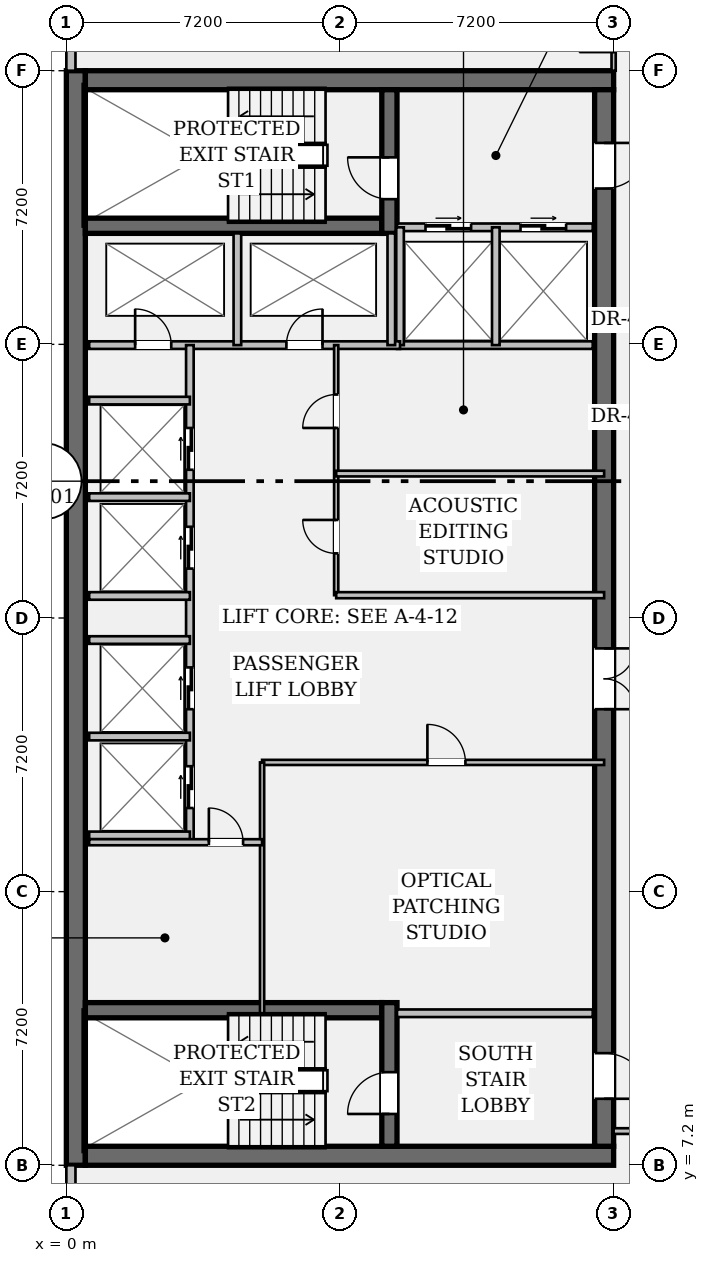
"""IFC4 building model, lengths in metres.
Left out: names, types, materials, properties, quantities, classifications, styles, units other than length and angle.
Written with IfcOpenShell. Run it as: python <this file> out.ifc"""

import sys

from ifc_helpers import new_model, si_unit, direction, frame, frame_2d, origin, place, context, subcontext, project, spatial, rectangle, extrude, element, fill, save


model = new_model("IFC4")
c1 = context("Model", 3, precision=1e-05, world=origin(), true_north=direction((0.0, 1.0)))
c2 = subcontext(c1, "Body", "Model", "MODEL_VIEW")
j1 = project(units=[si_unit("LENGTHUNIT", "METRE"), si_unit("PLANEANGLEUNIT", "RADIAN")], contexts=[c1])
p1 = place(None, origin())
s1 = spatial("IfcSite", under=j1, at=p1, CompositionType="ELEMENT")
p2 = place(p1, origin())
s2 = spatial("IfcBuilding", under=s1, at=p2, CompositionType="ELEMENT")
p3 = place(p2, frame((0.0, 0.0, 197.75)))
s3 = spatial("IfcBuildingStorey", under=s2, at=p3, CompositionType="ELEMENT", Elevation=197.75)
p4 = place(p3, frame((0.25, 7.2, 0.0), z_axis=(0.0, 0.0, 1.0), x_axis=(0.0, 1.0, 0.0)))
e1 = element("IfcWall", 1, at=p4, inside=s3, PredefinedType="SHEAR", context=c2, shape_type="SweptSolid", body=[
    extrude(rectangle(XDim=28.8, YDim=0.5, at=frame_2d((14.4, 0.0))), origin(), (0.0, 0.0, 1.0), 3.24),
])
for number, where, z_axis, x_axis in (
    (2, (0.5, 7.45, 0.0), (0.0, 0.0, 1.0), (1.0, 0.0, 0.0)),
    (3, (0.5, 35.75, 0.0), (0.0, 0.0, 1.0), (1.0, 0.0, 0.0)),
):
    element("IfcWall", number, at=place(p3, frame(where, z_axis=z_axis, x_axis=x_axis)), inside=s3, PredefinedType="SHEAR", context=c2, shape_type="SweptSolid", body=[
        extrude(rectangle(XDim=13.9, YDim=0.5, at=frame_2d((6.95, 0.0))), origin(), (0.0, 0.0, 1.0), 3.24),
    ])
p5 = place(p3, frame((14.15, 35.5, 0.0), z_axis=(0.0, 0.0, 1.0), x_axis=(0.0, -1.0, 0.0)))
e4 = element("IfcWall", 4, at=p5, inside=s3, PredefinedType="SHEAR", context=c2, shape_type="SweptSolid", body=[
    extrude(rectangle(XDim=27.8, YDim=0.5, at=frame_2d((13.9, 0.0))), origin(), (0.0, 0.0, 1.0), 3.24),
])
p6 = place(p5, frame((1.4, 0.0, 0.0)))
e5 = element("IfcOpeningElement", 5, at=p6, cuts=e4, PredefinedType="OPENING", context=c2, shape_type="SweptSolid", body=[
    extrude(rectangle(XDim=1.2, YDim=2.15, at=frame_2d((0.6, 1.075))), frame((0.0, 0.262, 0.0), z_axis=(0.0, -1.0, 0.0), x_axis=(1.0, 0.0, 0.0)), (0.0, 0.0, 1.0), 0.524),
])
p7 = place(p5, frame((25.35, 0.0, 0.0)))
e6 = element("IfcOpeningElement", 6, at=p7, cuts=e4, PredefinedType="OPENING", context=c2, shape_type="SweptSolid", body=[
    extrude(rectangle(XDim=1.2, YDim=2.15, at=frame_2d((0.6, 1.075))), frame((0.0, 0.262, 0.0), z_axis=(0.0, -1.0, 0.0), x_axis=(1.0, 0.0, 0.0)), (0.0, 0.0, 1.0), 0.524),
])
p8 = place(p5, frame((14.7, 0.0, 0.0)))
e7 = element("IfcOpeningElement", 7, at=p8, cuts=e4, PredefinedType="OPENING", context=c2, shape_type="SweptSolid", body=[
    extrude(rectangle(XDim=1.6, YDim=2.2, at=frame_2d((0.8, 1.1))), frame((0.0, 0.262, 0.0), z_axis=(0.0, -1.0, 0.0), x_axis=(1.0, 0.0, 0.0)), (0.0, 0.0, 1.0), 0.524),
])
for number, where, z_axis, x_axis in (
    (8, (0.5, 31.92, 0.0), (0.0, 0.0, 1.0), (1.0, 0.0, 0.0)),
    (9, (0.5, 11.28, 0.0), (0.0, 0.0, 1.0), (1.0, 0.0, 0.0)),
):
    element("IfcWall", number, at=place(p3, frame(where, z_axis=z_axis, x_axis=x_axis)), inside=s3, PredefinedType="SHEAR", context=c2, shape_type="SweptSolid", body=[
        extrude(rectangle(XDim=7.8, YDim=0.4, at=frame_2d((3.9, 0.0))), origin(), (0.0, 0.0, 1.0), 3.24),
    ])
p9 = place(p3, frame((8.5, 31.72, 0.0), z_axis=(0.0, 0.0, 1.0), x_axis=(0.0, 1.0, 0.0)))
e10 = element("IfcWall", 10, at=p9, inside=s3, PredefinedType="SHEAR", context=c2, shape_type="SweptSolid", body=[
    extrude(rectangle(XDim=3.78, YDim=0.4, at=frame_2d((1.89, 0.0))), origin(), (0.0, 0.0, 1.0), 3.24),
])
p10 = place(p9, frame((0.9, 0.0, 0.0)))
e11 = element("IfcOpeningElement", 11, at=p10, cuts=e10, PredefinedType="OPENING", context=c2, shape_type="SweptSolid", body=[
    extrude(rectangle(XDim=1.1, YDim=2.15, at=frame_2d((0.55, 1.075))), frame((0.0, 0.212, 0.0), z_axis=(0.0, -1.0, 0.0), x_axis=(1.0, 0.0, 0.0)), (0.0, 0.0, 1.0), 0.424),
])
p11 = place(p3, frame((8.5, 7.7, 0.0), z_axis=(0.0, 0.0, 1.0), x_axis=(0.0, 1.0, 0.0)))
e12 = element("IfcWall", 12, at=p11, inside=s3, PredefinedType="SHEAR", context=c2, shape_type="SweptSolid", body=[
    extrude(rectangle(XDim=3.78, YDim=0.4, at=frame_2d((1.89, 0.0))), origin(), (0.0, 0.0, 1.0), 3.24),
])
p12 = place(p11, frame((0.85, 0.0, 0.0)))
e13 = element("IfcOpeningElement", 13, at=p12, cuts=e12, PredefinedType="OPENING", context=c2, shape_type="SweptSolid", body=[
    extrude(rectangle(XDim=1.1, YDim=2.15, at=frame_2d((0.55, 1.075))), frame((0.0, 0.212, 0.0), z_axis=(0.0, -1.0, 0.0), x_axis=(1.0, 0.0, 0.0)), (0.0, 0.0, 1.0), 0.424),
])
for number, where, z_axis, x_axis in (
    (14, (0.12, 5.91, 0.0), (0.0, 0.0, 1.0), (0.0, 1.0, 0.0)),
    (15, (0.12, 36.0, 0.0), (0.0, 0.0, 1.0), (0.0, 1.0, 0.0)),
):
    element("IfcWall", number, at=place(p3, frame(where, z_axis=z_axis, x_axis=x_axis)), inside=s3, PredefinedType="STANDARD", context=c2, shape_type="SweptSolid", body=[
        extrude(rectangle(XDim=1.29, YDim=0.24, at=frame_2d((0.645, 0.0))), origin(), (0.0, 0.0, 1.0), 3.24),
    ])
p13 = place(p3, frame((8.7, 31.88, 0.0), z_axis=(0.0, 0.0, 1.0), x_axis=(1.0, 0.0, 0.0)))
e16 = element("IfcWall", 16, at=p13, inside=s3, PredefinedType="PARTITIONING", context=c2, shape_type="SweptSolid", body=[
    extrude(rectangle(XDim=5.15, YDim=0.2, at=frame_2d((2.575, 0.0))), origin(), (0.0, 0.0, 1.0), 3.24),
])
p14 = place(p13, frame((0.75, 0.0, 0.0)))
e17 = element("IfcOpeningElement", 17, at=p14, cuts=e16, PredefinedType="OPENING", context=c2, shape_type="SweptSolid", body=[
    extrude(rectangle(XDim=1.2, YDim=2.2, at=frame_2d((0.6, 1.1))), frame((0.0, 0.112, 0.0), z_axis=(0.0, -1.0, 0.0), x_axis=(1.0, 0.0, 0.0)), (0.0, 0.0, 1.0), 0.224),
])
p15 = place(p13, frame((3.25, 0.0, 0.0)))
e18 = element("IfcOpeningElement", 18, at=p15, cuts=e16, PredefinedType="OPENING", context=c2, shape_type="SweptSolid", body=[
    extrude(rectangle(XDim=1.2, YDim=2.2, at=frame_2d((0.6, 1.1))), frame((0.0, 0.112, 0.0), z_axis=(0.0, -1.0, 0.0), x_axis=(1.0, 0.0, 0.0)), (0.0, 0.0, 1.0), 0.224),
])
for number, where, z_axis, x_axis in (
    (19, (8.7, 11.2, 0.0), (0.0, 0.0, 1.0), (1.0, 0.0, 0.0)),
    (20, (8.7, 28.78, 0.0), (0.0, 0.0, 1.0), (1.0, 0.0, 0.0)),
):
    element("IfcWall", number, at=place(p3, frame(where, z_axis=z_axis, x_axis=x_axis)), inside=s3, PredefinedType="PARTITIONING", context=c2, shape_type="SweptSolid", body=[
        extrude(rectangle(XDim=5.15, YDim=0.2, at=frame_2d((2.575, 0.0))), origin(), (0.0, 0.0, 1.0), 3.24),
    ])
for number, where, z_axis, x_axis in (
    (21, (8.78, 28.78, 0.0), (0.0, 0.0, 1.0), (0.0, 1.0, 0.0)),
    (22, (11.3, 28.78, 0.0), (0.0, 0.0, 1.0), (0.0, 1.0, 0.0)),
):
    element("IfcWall", number, at=place(p3, frame(where, z_axis=z_axis, x_axis=x_axis)), inside=s3, PredefinedType="PARTITIONING", context=c2, shape_type="SweptSolid", body=[
        extrude(rectangle(XDim=3.1, YDim=0.2, at=frame_2d((1.55, 0.0))), origin(), (0.0, 0.0, 1.0), 3.24),
    ])
p16 = place(p3, frame((0.6, 28.78, 0.0), z_axis=(0.0, 0.0, 1.0), x_axis=(1.0, 0.0, 0.0)))
e23 = element("IfcWall", 23, at=p16, inside=s3, PredefinedType="PARTITIONING", context=c2, shape_type="SweptSolid", body=[
    extrude(rectangle(XDim=8.18, YDim=0.2, at=frame_2d((4.09, 0.0))), origin(), (0.0, 0.0, 1.0), 3.24),
])
p17 = place(p16, frame((1.21, 0.0, 0.0)))
e24 = element("IfcOpeningElement", 24, at=p17, cuts=e23, PredefinedType="OPENING", context=c2, shape_type="SweptSolid", body=[
    extrude(rectangle(XDim=0.95, YDim=2.15, at=frame_2d((0.475, 1.075))), frame((0.0, 0.112, 0.0), z_axis=(0.0, -1.0, 0.0), x_axis=(1.0, 0.0, 0.0)), (0.0, 0.0, 1.0), 0.224),
])
p18 = place(p16, frame((5.19, 0.0, 0.0)))
e25 = element("IfcOpeningElement", 25, at=p18, cuts=e23, PredefinedType="OPENING", context=c2, shape_type="SweptSolid", body=[
    extrude(rectangle(XDim=0.95, YDim=2.15, at=frame_2d((0.475, 1.075))), frame((0.0, 0.112, 0.0), z_axis=(0.0, -1.0, 0.0), x_axis=(1.0, 0.0, 0.0)), (0.0, 0.0, 1.0), 0.224),
])
for number, where, z_axis, x_axis in (
    (26, (4.5, 28.78, 0.0), (0.0, 0.0, 1.0), (0.0, 1.0, 0.0)),
    (27, (8.55, 28.78, 0.0), (0.0, 0.0, 1.0), (0.0, 1.0, 0.0)),
):
    element("IfcWall", number, at=place(p3, frame(where, z_axis=z_axis, x_axis=x_axis)), inside=s3, PredefinedType="PARTITIONING", context=c2, shape_type="SweptSolid", body=[
        extrude(rectangle(XDim=2.94, YDim=0.2, at=frame_2d((1.47, 0.0))), origin(), (0.0, 0.0, 1.0), 3.24),
    ])
p19 = place(p3, frame((3.25, 15.7, 0.0), z_axis=(0.0, 0.0, 1.0), x_axis=(0.0, 1.0, 0.0)))
e28 = element("IfcWall", 28, at=p19, inside=s3, PredefinedType="PARTITIONING", context=c2, shape_type="SweptSolid", body=[
    extrude(rectangle(XDim=13.08, YDim=0.2, at=frame_2d((6.54, 0.0))), origin(), (0.0, 0.0, 1.0), 3.24),
])
p20 = place(p19, frame((0.9, 0.0, 0.0)))
e29 = element("IfcOpeningElement", 29, at=p20, cuts=e28, PredefinedType="OPENING", context=c2, shape_type="SweptSolid", body=[
    extrude(rectangle(XDim=1.1, YDim=2.2, at=frame_2d((0.55, 1.1))), frame((0.0, 0.112, 0.0), z_axis=(0.0, -1.0, 0.0), x_axis=(1.0, 0.0, 0.0)), (0.0, 0.0, 1.0), 0.224),
])
p21 = place(p19, frame((3.5, 0.0, 0.0)))
e30 = element("IfcOpeningElement", 30, at=p21, cuts=e28, PredefinedType="OPENING", context=c2, shape_type="SweptSolid", body=[
    extrude(rectangle(XDim=1.1, YDim=2.2, at=frame_2d((0.55, 1.1))), frame((0.0, 0.112, 0.0), z_axis=(0.0, -1.0, 0.0), x_axis=(1.0, 0.0, 0.0)), (0.0, 0.0, 1.0), 0.224),
])
p22 = place(p19, frame((7.2, 0.0, 0.0)))
e31 = element("IfcOpeningElement", 31, at=p22, cuts=e28, PredefinedType="OPENING", context=c2, shape_type="SweptSolid", body=[
    extrude(rectangle(XDim=1.1, YDim=2.2, at=frame_2d((0.55, 1.1))), frame((0.0, 0.112, 0.0), z_axis=(0.0, -1.0, 0.0), x_axis=(1.0, 0.0, 0.0)), (0.0, 0.0, 1.0), 0.224),
])
p23 = place(p19, frame((9.8, 0.0, 0.0)))
e32 = element("IfcOpeningElement", 32, at=p23, cuts=e28, PredefinedType="OPENING", context=c2, shape_type="SweptSolid", body=[
    extrude(rectangle(XDim=1.1, YDim=2.2, at=frame_2d((0.55, 1.1))), frame((0.0, 0.112, 0.0), z_axis=(0.0, -1.0, 0.0), x_axis=(1.0, 0.0, 0.0)), (0.0, 0.0, 1.0), 0.224),
])
for number, where, z_axis, x_axis in (
    (33, (0.6, 15.88, 0.0), (0.0, 0.0, 1.0), (1.0, 0.0, 0.0)),
    (34, (0.6, 18.48, 0.0), (0.0, 0.0, 1.0), (1.0, 0.0, 0.0)),
    (35, (0.6, 22.18, 0.0), (0.0, 0.0, 1.0), (1.0, 0.0, 0.0)),
    (36, (0.6, 24.78, 0.0), (0.0, 0.0, 1.0), (1.0, 0.0, 0.0)),
    (37, (0.6, 21.02, 0.0), (0.0, 0.0, 1.0), (1.0, 0.0, 0.0)),
    (38, (0.6, 27.32, 0.0), (0.0, 0.0, 1.0), (1.0, 0.0, 0.0)),
):
    element("IfcWall", number, at=place(p3, frame(where, z_axis=z_axis, x_axis=x_axis)), inside=s3, PredefinedType="PARTITIONING", context=c2, shape_type="SweptSolid", body=[
        extrude(rectangle(XDim=2.65, YDim=0.2, at=frame_2d((1.325, 0.0))), origin(), (0.0, 0.0, 1.0), 3.24),
    ])
p24 = place(p3, frame((7.1, 22.2, 0.0), z_axis=(0.0, 0.0, 1.0), x_axis=(0.0, 1.0, 0.0)))
e39 = element("IfcWall", 39, at=p24, inside=s3, PredefinedType="PARTITIONING", context=c2, shape_type="SweptSolid", body=[
    extrude(rectangle(XDim=6.58, YDim=0.11, at=frame_2d((3.29, 0.0))), origin(), (0.0, 0.0, 1.0), 3.24),
])
p25 = place(p24, frame((1.1, 0.0, 0.0)))
e40 = element("IfcOpeningElement", 40, at=p25, cuts=e39, PredefinedType="OPENING", context=c2, shape_type="SweptSolid", body=[
    extrude(rectangle(XDim=0.88, YDim=2.15, at=frame_2d((0.44, 1.075))), frame((0.0, 0.067, 0.0), z_axis=(0.0, -1.0, 0.0), x_axis=(1.0, 0.0, 0.0)), (0.0, 0.0, 1.0), 0.134),
])
p26 = place(p24, frame((4.4, 0.0, 0.0)))
e41 = element("IfcOpeningElement", 41, at=p26, cuts=e39, PredefinedType="OPENING", context=c2, shape_type="SweptSolid", body=[
    extrude(rectangle(XDim=0.88, YDim=2.15, at=frame_2d((0.44, 1.075))), frame((0.0, 0.067, 0.0), z_axis=(0.0, -1.0, 0.0), x_axis=(1.0, 0.0, 0.0)), (0.0, 0.0, 1.0), 0.134),
])
p27 = place(p3, frame((7.1, 22.2, 0.0), z_axis=(0.0, 0.0, 1.0), x_axis=(1.0, 0.0, 0.0)))
e42 = element("IfcWall", 42, at=p27, inside=s3, PredefinedType="PARTITIONING", context=c2, shape_type="SweptSolid", body=[
    extrude(rectangle(XDim=7.05, YDim=0.16, at=frame_2d((3.525, 0.0))), origin(), (0.0, 0.0, 1.0), 3.24),
])
p28 = place(p3, frame((7.1, 25.4, 0.0), z_axis=(0.0, 0.0, 1.0), x_axis=(1.0, 0.0, 0.0)))
e43 = element("IfcWall", 43, at=p28, inside=s3, PredefinedType="PARTITIONING", context=c2, shape_type="SweptSolid", body=[
    extrude(rectangle(XDim=7.05, YDim=0.15, at=frame_2d((3.525, 0.0))), origin(), (0.0, 0.0, 1.0), 3.24),
])
p29 = place(p3, frame((5.15, 17.8, 0.0), z_axis=(0.0, 0.0, 1.0), x_axis=(1.0, 0.0, 0.0)))
e44 = element("IfcWall", 44, at=p29, inside=s3, PredefinedType="PARTITIONING", context=c2, shape_type="SweptSolid", body=[
    extrude(rectangle(XDim=9.0, YDim=0.135, at=frame_2d((4.5, 0.0))), origin(), (0.0, 0.0, 1.0), 3.24),
])
p30 = place(p29, frame((4.35, 0.0, 0.0)))
e45 = element("IfcOpeningElement", 45, at=p30, cuts=e44, PredefinedType="OPENING", context=c2, shape_type="SweptSolid", body=[
    extrude(rectangle(XDim=1.0, YDim=2.15, at=frame_2d((0.5, 1.075))), frame((0.0, 0.08, 0.0), z_axis=(0.0, -1.0, 0.0), x_axis=(1.0, 0.0, 0.0)), (0.0, 0.0, 1.0), 0.159),
])
p31 = place(p3, frame((5.15, 11.2, 0.0), z_axis=(0.0, 0.0, 1.0), x_axis=(0.0, 1.0, 0.0)))
e46 = element("IfcWall", 46, at=p31, inside=s3, PredefinedType="PARTITIONING", context=c2, shape_type="SweptSolid", body=[
    extrude(rectangle(XDim=6.6, YDim=0.11, at=frame_2d((3.3, 0.0))), origin(), (0.0, 0.0, 1.0), 3.24),
])
p32 = place(p3, frame((0.6, 15.7, 0.0), z_axis=(0.0, 0.0, 1.0), x_axis=(1.0, 0.0, 0.0)))
e47 = element("IfcWall", 47, at=p32, inside=s3, PredefinedType="PARTITIONING", context=c2, shape_type="SweptSolid", body=[
    extrude(rectangle(XDim=4.55, YDim=0.16, at=frame_2d((2.275, 0.0))), origin(), (0.0, 0.0, 1.0), 3.24),
])
p33 = place(p32, frame((3.15, 0.0, 0.0)))
e48 = element("IfcOpeningElement", 48, at=p33, cuts=e47, PredefinedType="OPENING", context=c2, shape_type="SweptSolid", body=[
    extrude(rectangle(XDim=0.9, YDim=2.15, at=frame_2d((0.45, 1.075))), frame((0.0, 0.092, 0.0), z_axis=(0.0, -1.0, 0.0), x_axis=(1.0, 0.0, 0.0)), (0.0, 0.0, 1.0), 0.184),
])
p34 = place(p3, frame((14.4, 8.1, 0.0), z_axis=(0.0, 0.0, 1.0), x_axis=(1.0, 0.0, 0.0)))
e49 = element("IfcWall", 49, at=p34, inside=s3, PredefinedType="PARTITIONING", context=c2, shape_type="SweptSolid", body=[
    extrude(rectangle(XDim=2.95, YDim=0.15, at=frame_2d((1.475, 0.0))), origin(), (0.0, 0.0, 1.0), 2.808),
])
p35 = place(p34, frame((0.95, 0.0, 0.0)))
e50 = element("IfcOpeningElement", 50, at=p35, cuts=e49, PredefinedType="OPENING", context=c2, shape_type="SweptSolid", body=[
    extrude(rectangle(XDim=0.88, YDim=2.15, at=frame_2d((0.44, 1.075))), frame((0.0, 0.087, 0.0), z_axis=(0.0, -1.0, 0.0), x_axis=(1.0, 0.0, 0.0)), (0.0, 0.0, 1.0), 0.174),
])
p36 = place(p3, frame((14.4, 36.0, 0.0), z_axis=(0.0, 0.0, 1.0), x_axis=(0.0, 1.0, 0.0)))
e51 = element("IfcWall", 51, at=p36, inside=s3, PredefinedType="PARTITIONING", context=c2, shape_type="SweptSolid", body=[
    extrude(rectangle(XDim=3.88, YDim=0.11, at=frame_2d((1.94, 0.0))), origin(), (0.0, 0.0, 1.0), 2.613),
])
p37 = place(p36, frame((0.49, 0.0, 0.0)))
e52 = element("IfcOpeningElement", 52, at=p37, cuts=e51, PredefinedType="OPENING", context=c2, shape_type="SweptSolid", body=[
    extrude(rectangle(XDim=0.9, YDim=2.15, at=frame_2d((0.45, 1.075))), frame((0.0, 0.067, 0.0), z_axis=(0.0, -1.0, 0.0), x_axis=(1.0, 0.0, 0.0)), (0.0, 0.0, 1.0), 0.134),
])
p38 = place(p10, origin())
e53 = element("IfcDoor", 53, at=p38, inside=s3, OperationType="SINGLE_SWING_RIGHT", PredefinedType="DOOR", context=c2, shape_type="SweptSolid", body=[
    extrude(rectangle(XDim=1.1, YDim=2.15, at=frame_2d((0.55, 1.075))), frame((0.0, 0.025, 0.0), z_axis=(0.0, -1.0, 0.0), x_axis=(1.0, 0.0, 0.0)), (0.0, 0.0, 1.0), 0.05),
])
fill(e11, e53)
p39 = place(p6, origin())
e54 = element("IfcDoor", 54, at=p39, inside=s3, OperationType="SINGLE_SWING_LEFT", PredefinedType="DOOR", context=c2, shape_type="SweptSolid", body=[
    extrude(rectangle(XDim=1.2, YDim=2.15, at=frame_2d((0.6, 1.075))), frame((0.0, 0.025, 0.0), z_axis=(0.0, -1.0, 0.0), x_axis=(1.0, 0.0, 0.0)), (0.0, 0.0, 1.0), 0.05),
])
fill(e5, e54)
p40 = place(p12, origin())
e55 = element("IfcDoor", 55, at=p40, inside=s3, OperationType="SINGLE_SWING_LEFT", PredefinedType="DOOR", context=c2, shape_type="SweptSolid", body=[
    extrude(rectangle(XDim=1.1, YDim=2.15, at=frame_2d((0.55, 1.075))), frame((0.0, 0.025, 0.0), z_axis=(0.0, -1.0, 0.0), x_axis=(1.0, 0.0, 0.0)), (0.0, 0.0, 1.0), 0.05),
])
fill(e13, e55)
p41 = place(p7, origin())
e56 = element("IfcDoor", 56, at=p41, inside=s3, OperationType="SINGLE_SWING_RIGHT", PredefinedType="DOOR", context=c2, shape_type="SweptSolid", body=[
    extrude(rectangle(XDim=1.2, YDim=2.15, at=frame_2d((0.6, 1.075))), frame((0.0, 0.025, 0.0), z_axis=(0.0, -1.0, 0.0), x_axis=(1.0, 0.0, 0.0)), (0.0, 0.0, 1.0), 0.05),
])
fill(e6, e56)
p42 = place(p14, origin())
e57 = element("IfcDoor", 57, at=p42, inside=s3, OperationType="DOUBLE_DOOR_SLIDING", PredefinedType="DOOR", context=c2, shape_type="SweptSolid", body=[
    extrude(rectangle(XDim=1.2, YDim=2.2, at=frame_2d((0.6, 1.1))), frame((0.0, 0.025, 0.0), z_axis=(0.0, -1.0, 0.0), x_axis=(1.0, 0.0, 0.0)), (0.0, 0.0, 1.0), 0.05),
])
fill(e17, e57)
p43 = place(p15, origin())
e58 = element("IfcDoor", 58, at=p43, inside=s3, OperationType="DOUBLE_DOOR_SLIDING", PredefinedType="DOOR", context=c2, shape_type="SweptSolid", body=[
    extrude(rectangle(XDim=1.2, YDim=2.2, at=frame_2d((0.6, 1.1))), frame((0.0, 0.025, 0.0), z_axis=(0.0, -1.0, 0.0), x_axis=(1.0, 0.0, 0.0)), (0.0, 0.0, 1.0), 0.05),
])
fill(e18, e58)
p44 = place(p17, origin())
e59 = element("IfcDoor", 59, at=p44, inside=s3, OperationType="SINGLE_SWING_LEFT", PredefinedType="DOOR", context=c2, shape_type="SweptSolid", body=[
    extrude(rectangle(XDim=0.95, YDim=2.15, at=frame_2d((0.475, 1.075))), frame((0.0, 0.025, 0.0), z_axis=(0.0, -1.0, 0.0), x_axis=(1.0, 0.0, 0.0)), (0.0, 0.0, 1.0), 0.05),
])
fill(e24, e59)
p45 = place(p18, origin())
e60 = element("IfcDoor", 60, at=p45, inside=s3, OperationType="SINGLE_SWING_RIGHT", PredefinedType="DOOR", context=c2, shape_type="SweptSolid", body=[
    extrude(rectangle(XDim=0.95, YDim=2.15, at=frame_2d((0.475, 1.075))), frame((0.0, 0.025, 0.0), z_axis=(0.0, -1.0, 0.0), x_axis=(1.0, 0.0, 0.0)), (0.0, 0.0, 1.0), 0.05),
])
fill(e25, e60)
p46 = place(p8, origin())
e61 = element("IfcDoor", 61, at=p46, inside=s3, OperationType="DOUBLE_DOOR_SINGLE_SWING", PredefinedType="DOOR", context=c2, shape_type="SweptSolid", body=[
    extrude(rectangle(XDim=1.6, YDim=2.2, at=frame_2d((0.8, 1.1))), frame((0.0, 0.025, 0.0), z_axis=(0.0, -1.0, 0.0), x_axis=(1.0, 0.0, 0.0)), (0.0, 0.0, 1.0), 0.05),
])
fill(e7, e61)
p47 = place(p20, origin())
e62 = element("IfcDoor", 62, at=p47, inside=s3, OperationType="DOUBLE_DOOR_SLIDING", PredefinedType="DOOR", context=c2, shape_type="SweptSolid", body=[
    extrude(rectangle(XDim=1.1, YDim=2.2, at=frame_2d((0.55, 1.1))), frame((0.0, 0.025, 0.0), z_axis=(0.0, -1.0, 0.0), x_axis=(1.0, 0.0, 0.0)), (0.0, 0.0, 1.0), 0.05),
])
fill(e29, e62)
p48 = place(p21, origin())
e63 = element("IfcDoor", 63, at=p48, inside=s3, OperationType="DOUBLE_DOOR_SLIDING", PredefinedType="DOOR", context=c2, shape_type="SweptSolid", body=[
    extrude(rectangle(XDim=1.1, YDim=2.2, at=frame_2d((0.55, 1.1))), frame((0.0, 0.025, 0.0), z_axis=(0.0, -1.0, 0.0), x_axis=(1.0, 0.0, 0.0)), (0.0, 0.0, 1.0), 0.05),
])
fill(e30, e63)
p49 = place(p22, origin())
e64 = element("IfcDoor", 64, at=p49, inside=s3, OperationType="DOUBLE_DOOR_SLIDING", PredefinedType="DOOR", context=c2, shape_type="SweptSolid", body=[
    extrude(rectangle(XDim=1.1, YDim=2.2, at=frame_2d((0.55, 1.1))), frame((0.0, 0.025, 0.0), z_axis=(0.0, -1.0, 0.0), x_axis=(1.0, 0.0, 0.0)), (0.0, 0.0, 1.0), 0.05),
])
fill(e31, e64)
p50 = place(p23, origin())
e65 = element("IfcDoor", 65, at=p50, inside=s3, OperationType="DOUBLE_DOOR_SLIDING", PredefinedType="DOOR", context=c2, shape_type="SweptSolid", body=[
    extrude(rectangle(XDim=1.1, YDim=2.2, at=frame_2d((0.55, 1.1))), frame((0.0, 0.025, 0.0), z_axis=(0.0, -1.0, 0.0), x_axis=(1.0, 0.0, 0.0)), (0.0, 0.0, 1.0), 0.05),
])
fill(e32, e65)
p51 = place(p25, origin())
e66 = element("IfcDoor", 66, at=p51, inside=s3, OperationType="SINGLE_SWING_RIGHT", PredefinedType="DOOR", context=c2, shape_type="SweptSolid", body=[
    extrude(rectangle(XDim=0.88, YDim=2.15, at=frame_2d((0.44, 1.075))), frame((0.0, 0.025, 0.0), z_axis=(0.0, -1.0, 0.0), x_axis=(1.0, 0.0, 0.0)), (0.0, 0.0, 1.0), 0.05),
])
fill(e40, e66)
p52 = place(p26, origin())
e67 = element("IfcDoor", 67, at=p52, inside=s3, OperationType="SINGLE_SWING_LEFT", PredefinedType="DOOR", context=c2, shape_type="SweptSolid", body=[
    extrude(rectangle(XDim=0.88, YDim=2.15, at=frame_2d((0.44, 1.075))), frame((0.0, 0.025, 0.0), z_axis=(0.0, -1.0, 0.0), x_axis=(1.0, 0.0, 0.0)), (0.0, 0.0, 1.0), 0.05),
])
fill(e41, e67)
p53 = place(p30, origin())
e68 = element("IfcDoor", 68, at=p53, inside=s3, OperationType="SINGLE_SWING_LEFT", PredefinedType="DOOR", context=c2, shape_type="SweptSolid", body=[
    extrude(rectangle(XDim=1.0, YDim=2.15, at=frame_2d((0.5, 1.075))), frame((0.0, 0.025, 0.0), z_axis=(0.0, -1.0, 0.0), x_axis=(1.0, 0.0, 0.0)), (0.0, 0.0, 1.0), 0.05),
])
fill(e45, e68)
p54 = place(p33, origin())
e69 = element("IfcDoor", 69, at=p54, inside=s3, OperationType="SINGLE_SWING_LEFT", PredefinedType="DOOR", context=c2, shape_type="SweptSolid", body=[
    extrude(rectangle(XDim=0.9, YDim=2.15, at=frame_2d((0.45, 1.075))), frame((0.0, 0.025, 0.0), z_axis=(0.0, -1.0, 0.0), x_axis=(1.0, 0.0, 0.0)), (0.0, 0.0, 1.0), 0.05),
])
fill(e48, e69)
save(model, sys.argv[1])
